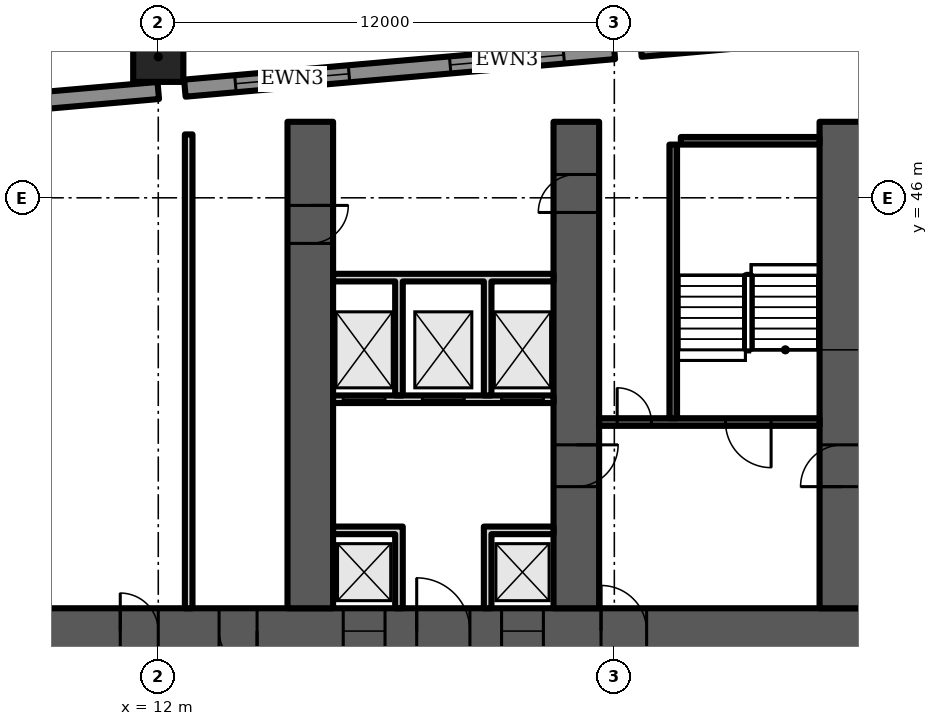
"""IFC4 building model, lengths in metres.
Left out: names, types, materials, properties, quantities, classifications, styles, units other than length and angle.
Written with IfcOpenShell. Run it as: python <this file> out.ifc"""

import sys

from ifc_helpers import new_model, si_unit, direction, frame, frame_2d, origin, origin_2d, place, context, subcontext, project, spatial, polyline, rectangle, outline, extrude, element, fill, save


model = new_model("IFC4")
c1 = context("Model", 3, precision=1e-05, world=origin(), true_north=direction((0.0, 1.0)))
c2 = subcontext(c1, "Body", "Model", "MODEL_VIEW")
j1 = project(units=[si_unit("LENGTHUNIT", "METRE"), si_unit("PLANEANGLEUNIT", "RADIAN")], contexts=[c1])
p1 = place(None, origin())
s1 = spatial("IfcSite", under=j1, at=p1, CompositionType="ELEMENT")
p2 = place(p1, origin())
s2 = spatial("IfcBuilding", under=s1, at=p2, CompositionType="ELEMENT")
p3 = place(p2, frame((0.0, 0.0, 21.5)))
s3 = spatial("IfcBuildingStorey", under=s2, at=p3, CompositionType="ELEMENT", Elevation=21.5)
p4 = place(p3, frame((12.0, 49.71, 0.0), z_axis=(0.0, 0.0, 1.0), x_axis=(1.0, 0.0, 0.0)))
e1 = element("IfcColumn", 1, at=p4, inside=s3, PredefinedType="COLUMN", context=c2, shape_type="SweptSolid", body=[
    extrude(rectangle(XDim=1.32, YDim=1.32, at=origin_2d()), origin(), (0.0, 0.0, 1.0), 6.0),
])
p5 = place(p3, frame((36.0, 50.924, 0.0), z_axis=(0.0, 0.0, 1.0), x_axis=(-0.996195, -0.087145, 0.0)))
e2 = element("IfcWall", 2, at=p5, inside=s3, PredefinedType="SOLIDWALL", context=c2, shape_type="SweptSolid", body=[
    extrude(rectangle(XDim=11.344, YDim=0.45, at=frame_2d((5.672, 0.0))), origin(), (0.0, 0.0, 1.0), 5.7),
])
p6 = place(p5, frame((1.336, 0.0, 1.0)))
e3 = element("IfcOpeningElement", 3, at=p6, cuts=e2, PredefinedType="OPENING", context=c2, shape_type="SweptSolid", body=[
    extrude(rectangle(XDim=3.0, YDim=3.7, at=frame_2d((1.5, 1.85))), frame((0.0, 0.235, 0.0), z_axis=(0.0, -1.0, 0.0), x_axis=(1.0, 0.0, 0.0)), (0.0, 0.0, 1.0), 0.47),
])
p7 = place(p5, frame((7.008, 0.0, 1.0)))
e4 = element("IfcOpeningElement", 4, at=p7, cuts=e2, PredefinedType="OPENING", context=c2, shape_type="SweptSolid", body=[
    extrude(rectangle(XDim=3.0, YDim=3.7, at=frame_2d((1.5, 1.85))), frame((0.0, 0.235, 0.0), z_axis=(0.0, -1.0, 0.0), x_axis=(1.0, 0.0, 0.0)), (0.0, 0.0, 1.0), 0.47),
])
p8 = place(p3, frame((24.0, 49.874, 0.0), z_axis=(0.0, 0.0, 1.0), x_axis=(-0.996195, -0.087145, 0.0)))
e5 = element("IfcWall", 5, at=p8, inside=s3, PredefinedType="SOLIDWALL", context=c2, shape_type="SweptSolid", body=[
    extrude(rectangle(XDim=11.344, YDim=0.45, at=frame_2d((5.672, 0.0))), origin(), (0.0, 0.0, 1.0), 5.7),
])
p9 = place(p8, frame((1.336, 0.0, 1.0)))
e6 = element("IfcOpeningElement", 6, at=p9, cuts=e5, PredefinedType="OPENING", context=c2, shape_type="SweptSolid", body=[
    extrude(rectangle(XDim=3.0, YDim=3.7, at=frame_2d((1.5, 1.85))), frame((0.0, 0.235, 0.0), z_axis=(0.0, -1.0, 0.0), x_axis=(1.0, 0.0, 0.0)), (0.0, 0.0, 1.0), 0.47),
])
p10 = place(p8, frame((7.008, 0.0, 1.0)))
e7 = element("IfcOpeningElement", 7, at=p10, cuts=e5, PredefinedType="OPENING", context=c2, shape_type="SweptSolid", body=[
    extrude(rectangle(XDim=3.0, YDim=3.7, at=frame_2d((1.5, 1.85))), frame((0.0, 0.235, 0.0), z_axis=(0.0, -1.0, 0.0), x_axis=(1.0, 0.0, 0.0)), (0.0, 0.0, 1.0), 0.47),
])
p11 = place(p3, frame((12.0, 48.824, 0.0), z_axis=(0.0, 0.0, 1.0), x_axis=(-0.9962, -0.087124, 0.0)))
e8 = element("IfcWall", 8, at=p11, inside=s3, PredefinedType="SOLIDWALL", context=c2, shape_type="SweptSolid", body=[
    extrude(rectangle(XDim=3.859, YDim=0.45, at=frame_2d((1.929, 0.0))), origin(), (0.0, 0.0, 1.0), 5.7),
])
p12 = place(p3, frame((9.0, 34.6, 0.0), z_axis=(0.0, 0.0, 1.0), x_axis=(1.0, 0.0, 0.0)))
e9 = element("IfcWall", 9, at=p12, inside=s3, PredefinedType="SHEAR", context=c2, shape_type="SweptSolid", body=[
    extrude(rectangle(XDim=56.0, YDim=1.2, at=frame_2d((28.0, 0.0))), origin(), (0.0, 0.0, 1.0), 5.7),
])
p13 = place(p12, frame((2.0, 0.0, 0.0)))
e10 = element("IfcOpeningElement", 10, at=p13, cuts=e9, PredefinedType="OPENING", context=c2, shape_type="SweptSolid", body=[
    extrude(rectangle(XDim=1.0, YDim=2.1, at=frame_2d((0.5, 1.05))), frame((0.0, 0.61, 0.0), z_axis=(0.0, -1.0, 0.0), x_axis=(1.0, 0.0, 0.0)), (0.0, 0.0, 1.0), 1.22),
])
p14 = place(p12, frame((4.6, 0.0, 0.0)))
e11 = element("IfcOpeningElement", 11, at=p14, cuts=e9, PredefinedType="OPENING", context=c2, shape_type="SweptSolid", body=[
    extrude(rectangle(XDim=1.0, YDim=2.1, at=frame_2d((0.5, 1.05))), frame((0.0, 0.61, 0.0), z_axis=(0.0, -1.0, 0.0), x_axis=(1.0, 0.0, 0.0)), (0.0, 0.0, 1.0), 1.22),
])
p15 = place(p12, frame((7.867, 0.0, 0.0)))
e12 = element("IfcOpeningElement", 12, at=p15, cuts=e9, PredefinedType="OPENING", context=c2, shape_type="SweptSolid", body=[
    extrude(rectangle(XDim=1.1, YDim=2.1, at=frame_2d((0.55, 1.05))), frame((0.0, 0.61, 0.0), z_axis=(0.0, -1.0, 0.0), x_axis=(1.0, 0.0, 0.0)), (0.0, 0.0, 1.0), 1.22),
])
p16 = place(p12, frame((12.033, 0.0, 0.0)))
e13 = element("IfcOpeningElement", 13, at=p16, cuts=e9, PredefinedType="OPENING", context=c2, shape_type="SweptSolid", body=[
    extrude(rectangle(XDim=1.1, YDim=2.1, at=frame_2d((0.55, 1.05))), frame((0.0, 0.61, 0.0), z_axis=(0.0, -1.0, 0.0), x_axis=(1.0, 0.0, 0.0)), (0.0, 0.0, 1.0), 1.22),
])
p17 = place(p12, frame((9.8, 0.0, 0.0)))
e14 = element("IfcOpeningElement", 14, at=p17, cuts=e9, PredefinedType="OPENING", context=c2, shape_type="SweptSolid", body=[
    extrude(rectangle(XDim=1.4, YDim=2.1, at=frame_2d((0.7, 1.05))), frame((0.0, 0.61, 0.0), z_axis=(0.0, -1.0, 0.0), x_axis=(1.0, 0.0, 0.0)), (0.0, 0.0, 1.0), 1.22),
])
p18 = place(p12, frame((14.65, 0.0, 0.0)))
e15 = element("IfcOpeningElement", 15, at=p18, cuts=e9, PredefinedType="OPENING", context=c2, shape_type="SweptSolid", body=[
    extrude(rectangle(XDim=1.2, YDim=2.1, at=frame_2d((0.6, 1.05))), frame((0.0, 0.61, 0.0), z_axis=(0.0, -1.0, 0.0), x_axis=(1.0, 0.0, 0.0)), (0.0, 0.0, 1.0), 1.22),
])
p19 = place(p12, frame((21.867, 0.0, 0.0)))
e16 = element("IfcOpeningElement", 16, at=p19, cuts=e9, PredefinedType="OPENING", context=c2, shape_type="SweptSolid", body=[
    extrude(rectangle(XDim=1.1, YDim=2.1, at=frame_2d((0.55, 1.05))), frame((0.0, 0.61, 0.0), z_axis=(0.0, -1.0, 0.0), x_axis=(1.0, 0.0, 0.0)), (0.0, 0.0, 1.0), 1.22),
])
p20 = place(p12, frame((26.033, 0.0, 0.0)))
e17 = element("IfcOpeningElement", 17, at=p20, cuts=e9, PredefinedType="OPENING", context=c2, shape_type="SweptSolid", body=[
    extrude(rectangle(XDim=1.1, YDim=2.1, at=frame_2d((0.55, 1.05))), frame((0.0, 0.61, 0.0), z_axis=(0.0, -1.0, 0.0), x_axis=(1.0, 0.0, 0.0)), (0.0, 0.0, 1.0), 1.22),
])
p21 = place(p12, frame((23.8, 0.0, 0.0)))
e18 = element("IfcOpeningElement", 18, at=p21, cuts=e9, PredefinedType="OPENING", context=c2, shape_type="SweptSolid", body=[
    extrude(rectangle(XDim=1.4, YDim=2.1, at=frame_2d((0.7, 1.05))), frame((0.0, 0.61, 0.0), z_axis=(0.0, -1.0, 0.0), x_axis=(1.0, 0.0, 0.0)), (0.0, 0.0, 1.0), 1.22),
])
p22 = place(p12, frame((28.867, 0.0, 0.0)))
e19 = element("IfcOpeningElement", 19, at=p22, cuts=e9, PredefinedType="OPENING", context=c2, shape_type="SweptSolid", body=[
    extrude(rectangle(XDim=1.1, YDim=2.1, at=frame_2d((0.55, 1.05))), frame((0.0, 0.61, 0.0), z_axis=(0.0, -1.0, 0.0), x_axis=(1.0, 0.0, 0.0)), (0.0, 0.0, 1.0), 1.22),
])
p23 = place(p12, frame((33.033, 0.0, 0.0)))
e20 = element("IfcOpeningElement", 20, at=p23, cuts=e9, PredefinedType="OPENING", context=c2, shape_type="SweptSolid", body=[
    extrude(rectangle(XDim=1.1, YDim=2.1, at=frame_2d((0.55, 1.05))), frame((0.0, 0.61, 0.0), z_axis=(0.0, -1.0, 0.0), x_axis=(1.0, 0.0, 0.0)), (0.0, 0.0, 1.0), 1.22),
])
p24 = place(p12, frame((40.15, 0.0, 0.0)))
e21 = element("IfcOpeningElement", 21, at=p24, cuts=e9, PredefinedType="OPENING", context=c2, shape_type="SweptSolid", body=[
    extrude(rectangle(XDim=1.2, YDim=2.1, at=frame_2d((0.6, 1.05))), frame((0.0, 0.61, 0.0), z_axis=(0.0, -1.0, 0.0), x_axis=(1.0, 0.0, 0.0)), (0.0, 0.0, 1.0), 1.22),
])
p25 = place(p12, frame((44.8, 0.0, 0.0)))
e22 = element("IfcOpeningElement", 22, at=p25, cuts=e9, PredefinedType="OPENING", context=c2, shape_type="SweptSolid", body=[
    extrude(rectangle(XDim=1.4, YDim=2.1, at=frame_2d((0.7, 1.05))), frame((0.0, 0.61, 0.0), z_axis=(0.0, -1.0, 0.0), x_axis=(1.0, 0.0, 0.0)), (0.0, 0.0, 1.0), 1.22),
])
p26 = place(p12, frame((49.867, 0.0, 0.0)))
e23 = element("IfcOpeningElement", 23, at=p26, cuts=e9, PredefinedType="OPENING", context=c2, shape_type="SweptSolid", body=[
    extrude(rectangle(XDim=1.1, YDim=2.1, at=frame_2d((0.55, 1.05))), frame((0.0, 0.61, 0.0), z_axis=(0.0, -1.0, 0.0), x_axis=(1.0, 0.0, 0.0)), (0.0, 0.0, 1.0), 1.22),
])
p27 = place(p12, frame((53.5, 0.0, 0.0)))
e24 = element("IfcOpeningElement", 24, at=p27, cuts=e9, PredefinedType="OPENING", context=c2, shape_type="SweptSolid", body=[
    extrude(rectangle(XDim=1.1, YDim=2.1, at=frame_2d((0.55, 1.05))), frame((0.0, 0.61, 0.0), z_axis=(0.0, -1.0, 0.0), x_axis=(1.0, 0.0, 0.0)), (0.0, 0.0, 1.0), 1.22),
])
p28 = place(p12, frame((51.567, 0.0, 0.0)))
e25 = element("IfcOpeningElement", 25, at=p28, cuts=e9, PredefinedType="OPENING", context=c2, shape_type="SweptSolid", body=[
    extrude(rectangle(XDim=1.4, YDim=2.1, at=frame_2d((0.7, 1.05))), frame((0.0, 0.61, 0.0), z_axis=(0.0, -1.0, 0.0), x_axis=(1.0, 0.0, 0.0)), (0.0, 0.0, 1.0), 1.22),
])
p29 = place(p3, frame((16.0, 35.2, 0.0), z_axis=(0.0, 0.0, 1.0), x_axis=(0.0, 1.0, 0.0)))
e26 = element("IfcWall", 26, at=p29, inside=s3, PredefinedType="SHEAR", context=c2, shape_type="SweptSolid", body=[
    extrude(rectangle(XDim=12.8, YDim=1.2, at=frame_2d((6.4, 0.0))), origin(), (0.0, 0.0, 1.0), 5.7),
])
p30 = place(p29, frame((9.6, 0.0, 0.0)))
e27 = element("IfcOpeningElement", 27, at=p30, cuts=e26, PredefinedType="OPENING", context=c2, shape_type="SweptSolid", body=[
    extrude(rectangle(XDim=1.0, YDim=2.1, at=frame_2d((0.5, 1.05))), frame((0.0, 0.61, 0.0), z_axis=(0.0, -1.0, 0.0), x_axis=(1.0, 0.0, 0.0)), (0.0, 0.0, 1.0), 1.22),
])
p31 = place(p3, frame((23.0, 35.2, 0.0), z_axis=(0.0, 0.0, 1.0), x_axis=(0.0, 1.0, 0.0)))
e28 = element("IfcWall", 28, at=p31, inside=s3, PredefinedType="SHEAR", context=c2, shape_type="SweptSolid", body=[
    extrude(rectangle(XDim=12.8, YDim=1.2, at=frame_2d((6.4, 0.0))), origin(), (0.0, 0.0, 1.0), 5.7),
])
p32 = place(p31, frame((10.414, 0.0, 0.0)))
e29 = element("IfcOpeningElement", 29, at=p32, cuts=e28, PredefinedType="OPENING", context=c2, shape_type="SweptSolid", body=[
    extrude(rectangle(XDim=1.0, YDim=2.1, at=frame_2d((0.5, 1.05))), frame((0.0, 0.61, 0.0), z_axis=(0.0, -1.0, 0.0), x_axis=(1.0, 0.0, 0.0)), (0.0, 0.0, 1.0), 1.22),
])
p33 = place(p31, frame((3.2, 0.0, 0.0)))
e30 = element("IfcOpeningElement", 30, at=p33, cuts=e28, PredefinedType="OPENING", context=c2, shape_type="SweptSolid", body=[
    extrude(rectangle(XDim=1.1, YDim=2.1, at=frame_2d((0.55, 1.05))), frame((0.0, 0.61, 0.0), z_axis=(0.0, -1.0, 0.0), x_axis=(1.0, 0.0, 0.0)), (0.0, 0.0, 1.0), 1.22),
])
p34 = place(p3, frame((30.0, 35.2, 0.0), z_axis=(0.0, 0.0, 1.0), x_axis=(0.0, 1.0, 0.0)))
e31 = element("IfcWall", 31, at=p34, inside=s3, PredefinedType="SHEAR", context=c2, shape_type="SweptSolid", body=[
    extrude(rectangle(XDim=12.8, YDim=1.2, at=frame_2d((6.4, 0.0))), origin(), (0.0, 0.0, 1.0), 5.7),
])
p35 = place(p34, frame((3.2, 0.0, 0.0)))
e32 = element("IfcOpeningElement", 32, at=p35, cuts=e31, PredefinedType="OPENING", context=c2, shape_type="SweptSolid", body=[
    extrude(rectangle(XDim=1.1, YDim=2.1, at=frame_2d((0.55, 1.05))), frame((0.0, 0.61, 0.0), z_axis=(0.0, -1.0, 0.0), x_axis=(1.0, 0.0, 0.0)), (0.0, 0.0, 1.0), 1.22),
])
p36 = place(p3, frame((12.8, 35.2, 0.0), z_axis=(0.0, 0.0, 1.0), x_axis=(0.0, 1.0, 0.0)))
e33 = element("IfcWall", 33, at=p36, inside=s3, PredefinedType="PARTITIONING", context=c2, shape_type="SweptSolid", body=[
    extrude(rectangle(XDim=12.468, YDim=0.2, at=frame_2d((6.234, 0.0))), origin(), (0.0, 0.0, 1.0), 5.7),
])
p37 = place(p3, frame((16.6, 40.7, 0.0), z_axis=(0.0, 0.0, 1.0), x_axis=(1.0, 0.0, 0.0)))
e34 = element("IfcWall", 34, at=p37, inside=s3, PredefinedType="PARTITIONING", context=c2, shape_type="SweptSolid", body=[
    extrude(rectangle(XDim=5.8, YDim=0.2, at=frame_2d((2.9, 0.0))), origin(), (0.0, 0.0, 1.0), 5.7),
])
p38 = place(p37, frame((0.267, 0.0, 0.0)))
e35 = element("IfcOpeningElement", 35, at=p38, cuts=e34, PredefinedType="OPENING", context=c2, shape_type="SweptSolid", body=[
    extrude(rectangle(XDim=1.1, YDim=2.1, at=frame_2d((0.55, 1.05))), frame((0.0, 0.11, 0.0), z_axis=(0.0, -1.0, 0.0), x_axis=(1.0, 0.0, 0.0)), (0.0, 0.0, 1.0), 0.22),
])
p39 = place(p37, frame((2.35, 0.0, 0.0)))
e36 = element("IfcOpeningElement", 36, at=p39, cuts=e34, PredefinedType="OPENING", context=c2, shape_type="SweptSolid", body=[
    extrude(rectangle(XDim=1.1, YDim=2.1, at=frame_2d((0.55, 1.05))), frame((0.0, 0.11, 0.0), z_axis=(0.0, -1.0, 0.0), x_axis=(1.0, 0.0, 0.0)), (0.0, 0.0, 1.0), 0.22),
])
p40 = place(p37, frame((4.433, 0.0, 0.0)))
e37 = element("IfcOpeningElement", 37, at=p40, cuts=e34, PredefinedType="OPENING", context=c2, shape_type="SweptSolid", body=[
    extrude(rectangle(XDim=1.1, YDim=2.1, at=frame_2d((0.55, 1.05))), frame((0.0, 0.11, 0.0), z_axis=(0.0, -1.0, 0.0), x_axis=(1.0, 0.0, 0.0)), (0.0, 0.0, 1.0), 0.22),
])
p41 = place(p3, frame((0.0, 0.0, -0.0)))
e38 = element("IfcWall", 38, at=p41, inside=s3, PredefinedType="PARTITIONING", context=c2, shape_type="SweptSolid", body=[
    extrude(outline(polyline([(18.233, 37.15), (16.6, 37.15), (16.6, 37.35), (18.233, 37.35), (18.433, 37.35), (18.433, 35.2), (18.233, 35.2), (18.233, 37.15)])), origin(), (0.0, 0.0, 1.0), 5.7),
])
p42 = place(p3, frame((0.0, 0.0, -0.0)))
e39 = element("IfcWall", 39, at=p42, inside=s3, PredefinedType="PARTITIONING", context=c2, shape_type="SweptSolid", body=[
    extrude(outline(polyline([(20.567, 37.35), (20.767, 37.35), (22.4, 37.35), (22.4, 37.15), (20.767, 37.15), (20.767, 35.2), (20.567, 35.2), (20.567, 37.35)])), origin(), (0.0, 0.0, 1.0), 5.7),
])
p43 = place(p3, frame((0.0, 0.0, -0.0)))
e40 = element("IfcWall", 40, at=p43, inside=s3, PredefinedType="PARTITIONING", context=c2, shape_type="SweptSolid", body=[
    extrude(outline(polyline([(18.433, 40.8), (18.233, 40.8), (18.233, 43.8), (16.6, 43.8), (16.6, 44.0), (22.4, 44.0), (22.4, 43.8), (20.767, 43.8), (20.767, 40.8), (20.567, 40.8), (20.567, 43.8), (18.433, 43.8), (18.433, 40.8)])), origin(), (0.0, 0.0, 1.0), 5.7),
])
p44 = place(p3, frame((23.6, 40.1, 0.0), z_axis=(0.0, 0.0, 1.0), x_axis=(1.0, 0.0, 0.0)))
e41 = element("IfcWall", 41, at=p44, inside=s3, PredefinedType="SHEAR", context=c2, shape_type="SweptSolid", body=[
    extrude(rectangle(XDim=5.8, YDim=0.2, at=frame_2d((2.9, 0.0))), origin(), (0.0, 0.0, 1.0), 5.7),
])
p45 = place(p44, frame((3.325, 0.0, 0.0)))
e42 = element("IfcOpeningElement", 42, at=p45, cuts=e41, PredefinedType="OPENING", context=c2, shape_type="SweptSolid", body=[
    extrude(rectangle(XDim=1.2, YDim=2.1, at=frame_2d((0.6, 1.05))), frame((0.0, 0.11, 0.0), z_axis=(0.0, -1.0, 0.0), x_axis=(1.0, 0.0, 0.0)), (0.0, 0.0, 1.0), 0.22),
])
p46 = place(p44, frame((0.475, 0.0, 0.0)))
e43 = element("IfcOpeningElement", 43, at=p46, cuts=e41, PredefinedType="OPENING", context=c2, shape_type="SweptSolid", body=[
    extrude(rectangle(XDim=0.9, YDim=2.1, at=frame_2d((0.45, 1.05))), frame((0.0, 0.11, 0.0), z_axis=(0.0, -1.0, 0.0), x_axis=(1.0, 0.0, 0.0)), (0.0, 0.0, 1.0), 0.22),
])
p47 = place(p3, frame((25.55, 40.2, 0.0), z_axis=(0.0, 0.0, 1.0), x_axis=(0.0, 1.0, 0.0)))
e44 = element("IfcWall", 44, at=p47, inside=s3, PredefinedType="SHEAR", context=c2, shape_type="SweptSolid", body=[
    extrude(rectangle(XDim=7.2, YDim=0.2, at=frame_2d((3.6, 0.0))), origin(), (0.0, 0.0, 1.0), 5.7),
])
p48 = place(p3, frame((25.75, 47.5, 0.0), z_axis=(0.0, 0.0, 1.0), x_axis=(1.0, 0.0, 0.0)))
e45 = element("IfcWall", 45, at=p48, inside=s3, PredefinedType="SHEAR", context=c2, shape_type="SweptSolid", body=[
    extrude(rectangle(XDim=3.65, YDim=0.2, at=frame_2d((1.825, 0.0))), origin(), (0.0, 0.0, 1.0), 5.7),
])
p49 = place(p9, origin())
e46 = element("IfcWindow", 46, at=p49, inside=s3, PartitioningType="SINGLE_PANEL", PredefinedType="WINDOW", context=c2, shape_type="SweptSolid", body=[
    extrude(rectangle(XDim=3.0, YDim=3.7, at=frame_2d((1.5, 1.85))), frame((0.0, 0.105, 0.0), z_axis=(0.0, -1.0, 0.0), x_axis=(1.0, 0.0, 0.0)), (0.0, 0.0, 1.0), 0.06),
])
fill(e6, e46)
p50 = place(p10, origin())
e47 = element("IfcWindow", 47, at=p50, inside=s3, PartitioningType="SINGLE_PANEL", PredefinedType="WINDOW", context=c2, shape_type="SweptSolid", body=[
    extrude(rectangle(XDim=3.0, YDim=3.7, at=frame_2d((1.5, 1.85))), frame((0.0, 0.105, 0.0), z_axis=(0.0, -1.0, 0.0), x_axis=(1.0, 0.0, 0.0)), (0.0, 0.0, 1.0), 0.06),
])
fill(e7, e47)
p51 = place(p13, origin())
e48 = element("IfcDoor", 48, at=p51, inside=s3, OperationType="SINGLE_SWING_LEFT", PredefinedType="DOOR", context=c2, shape_type="SweptSolid", body=[
    extrude(rectangle(XDim=1.0, YDim=2.1, at=frame_2d((0.5, 1.05))), frame((0.0, 0.6, 0.0), z_axis=(0.0, -1.0, 0.0), x_axis=(1.0, 0.0, 0.0)), (0.0, 0.0, 1.0), 1.199),
])
fill(e10, e48)
p52 = place(p14, origin())
e49 = element("IfcDoor", 49, at=p52, inside=s3, OperationType="SINGLE_SWING_RIGHT", PredefinedType="DOOR", context=c2, shape_type="SweptSolid", body=[
    extrude(rectangle(XDim=1.0, YDim=2.1, at=frame_2d((0.5, 1.05))), frame((0.0, 0.6, 0.0), z_axis=(0.0, -1.0, 0.0), x_axis=(1.0, 0.0, 0.0)), (0.0, 0.0, 1.0), 1.199),
])
fill(e11, e49)
p53 = place(p15, origin())
e50 = element("IfcDoor", 50, at=p53, inside=s3, OperationType="DOUBLE_DOOR_SLIDING", PredefinedType="DOOR", context=c2, shape_type="SweptSolid", body=[
    extrude(rectangle(XDim=1.1, YDim=2.1, at=frame_2d((0.55, 1.05))), frame((0.0, 0.025, 0.0), z_axis=(0.0, -1.0, 0.0), x_axis=(1.0, 0.0, 0.0)), (0.0, 0.0, 1.0), 0.05),
])
fill(e12, e50)
p54 = place(p16, origin())
e51 = element("IfcDoor", 51, at=p54, inside=s3, OperationType="DOUBLE_DOOR_SLIDING", PredefinedType="DOOR", context=c2, shape_type="SweptSolid", body=[
    extrude(rectangle(XDim=1.1, YDim=2.1, at=frame_2d((0.55, 1.05))), frame((0.0, 0.025, 0.0), z_axis=(0.0, -1.0, 0.0), x_axis=(1.0, 0.0, 0.0)), (0.0, 0.0, 1.0), 0.05),
])
fill(e13, e51)
p55 = place(p17, origin())
e52 = element("IfcDoor", 52, at=p55, inside=s3, OperationType="DOUBLE_DOOR_SINGLE_SWING", PredefinedType="DOOR", context=c2, shape_type="SweptSolid", body=[
    extrude(rectangle(XDim=1.4, YDim=2.1, at=frame_2d((0.7, 1.05))), frame((0.0, 0.025, 0.0), z_axis=(0.0, -1.0, 0.0), x_axis=(1.0, 0.0, 0.0)), (0.0, 0.0, 1.0), 0.05),
])
fill(e14, e52)
p56 = place(p38, origin())
e53 = element("IfcDoor", 53, at=p56, inside=s3, OperationType="DOUBLE_DOOR_SLIDING", PredefinedType="DOOR", context=c2, shape_type="SweptSolid", body=[
    extrude(rectangle(XDim=1.1, YDim=2.1, at=frame_2d((0.55, 1.05))), frame((0.0, 0.025, 0.0), z_axis=(0.0, -1.0, 0.0), x_axis=(1.0, 0.0, 0.0)), (0.0, 0.0, 1.0), 0.05),
])
fill(e35, e53)
p57 = place(p39, origin())
e54 = element("IfcDoor", 54, at=p57, inside=s3, OperationType="DOUBLE_DOOR_SLIDING", PredefinedType="DOOR", context=c2, shape_type="SweptSolid", body=[
    extrude(rectangle(XDim=1.1, YDim=2.1, at=frame_2d((0.55, 1.05))), frame((0.0, 0.025, 0.0), z_axis=(0.0, -1.0, 0.0), x_axis=(1.0, 0.0, 0.0)), (0.0, 0.0, 1.0), 0.05),
])
fill(e36, e54)
p58 = place(p40, origin())
e55 = element("IfcDoor", 55, at=p58, inside=s3, OperationType="DOUBLE_DOOR_SLIDING", PredefinedType="DOOR", context=c2, shape_type="SweptSolid", body=[
    extrude(rectangle(XDim=1.1, YDim=2.1, at=frame_2d((0.55, 1.05))), frame((0.0, 0.025, 0.0), z_axis=(0.0, -1.0, 0.0), x_axis=(1.0, 0.0, 0.0)), (0.0, 0.0, 1.0), 0.05),
])
fill(e37, e55)
p59 = place(p32, origin())
e56 = element("IfcDoor", 56, at=p59, inside=s3, OperationType="SINGLE_SWING_LEFT", PredefinedType="DOOR", context=c2, shape_type="SweptSolid", body=[
    extrude(rectangle(XDim=1.0, YDim=2.1, at=frame_2d((0.5, 1.05))), frame((0.0, 0.6, 0.0), z_axis=(0.0, -1.0, 0.0), x_axis=(1.0, 0.0, 0.0)), (0.0, 0.0, 1.0), 1.199),
])
fill(e29, e56)
p60 = place(p45, origin())
e57 = element("IfcDoor", 57, at=p60, inside=s3, OperationType="SINGLE_SWING_RIGHT", PredefinedType="DOOR", context=c2, shape_type="SweptSolid", body=[
    extrude(rectangle(XDim=1.2, YDim=2.1, at=frame_2d((0.6, 1.05))), frame((0.0, 0.025, 0.0), z_axis=(0.0, -1.0, 0.0), x_axis=(1.0, 0.0, 0.0)), (0.0, 0.0, 1.0), 0.05),
])
fill(e42, e57)
p61 = place(p46, origin())
e58 = element("IfcDoor", 58, at=p61, inside=s3, OperationType="SINGLE_SWING_LEFT", PredefinedType="DOOR", context=c2, shape_type="SweptSolid", body=[
    extrude(rectangle(XDim=0.9, YDim=2.1, at=frame_2d((0.45, 1.05))), frame((0.0, 0.025, 0.0), z_axis=(0.0, -1.0, 0.0), x_axis=(1.0, 0.0, 0.0)), (0.0, 0.0, 1.0), 0.05),
])
fill(e43, e58)
p62 = place(p18, origin())
e59 = element("IfcDoor", 59, at=p62, inside=s3, OperationType="SINGLE_SWING_LEFT", PredefinedType="DOOR", context=c2, shape_type="SweptSolid", body=[
    extrude(rectangle(XDim=1.2, YDim=2.1, at=frame_2d((0.6, 1.05))), frame((0.0, 0.025, 0.0), z_axis=(0.0, -1.0, 0.0), x_axis=(1.0, 0.0, 0.0)), (0.0, 0.0, 1.0), 0.05),
])
fill(e15, e59)
p63 = place(p30, origin())
e60 = element("IfcDoor", 60, at=p63, inside=s3, OperationType="SINGLE_SWING_RIGHT", PredefinedType="DOOR", context=c2, shape_type="SweptSolid", body=[
    extrude(rectangle(XDim=1.0, YDim=2.1, at=frame_2d((0.5, 1.05))), frame((0.0, 0.6, 0.0), z_axis=(0.0, -1.0, 0.0), x_axis=(1.0, 0.0, 0.0)), (0.0, 0.0, 1.0), 1.199),
])
fill(e27, e60)
p64 = place(p33, origin())
e61 = element("IfcDoor", 61, at=p64, inside=s3, OperationType="SINGLE_SWING_RIGHT", PredefinedType="DOOR", context=c2, shape_type="SweptSolid", body=[
    extrude(rectangle(XDim=1.1, YDim=2.1, at=frame_2d((0.55, 1.05))), frame((0.0, 0.025, 0.0), z_axis=(0.0, -1.0, 0.0), x_axis=(1.0, 0.0, 0.0)), (0.0, 0.0, 1.0), 0.05),
])
fill(e30, e61)
p65 = place(p35, origin())
e62 = element("IfcDoor", 62, at=p65, inside=s3, OperationType="SINGLE_SWING_LEFT", PredefinedType="DOOR", context=c2, shape_type="SweptSolid", body=[
    extrude(rectangle(XDim=1.1, YDim=2.1, at=frame_2d((0.55, 1.05))), frame((0.0, 0.025, 0.0), z_axis=(0.0, -1.0, 0.0), x_axis=(1.0, 0.0, 0.0)), (0.0, 0.0, 1.0), 0.05),
])
fill(e32, e62)
save(model, sys.argv[1])
